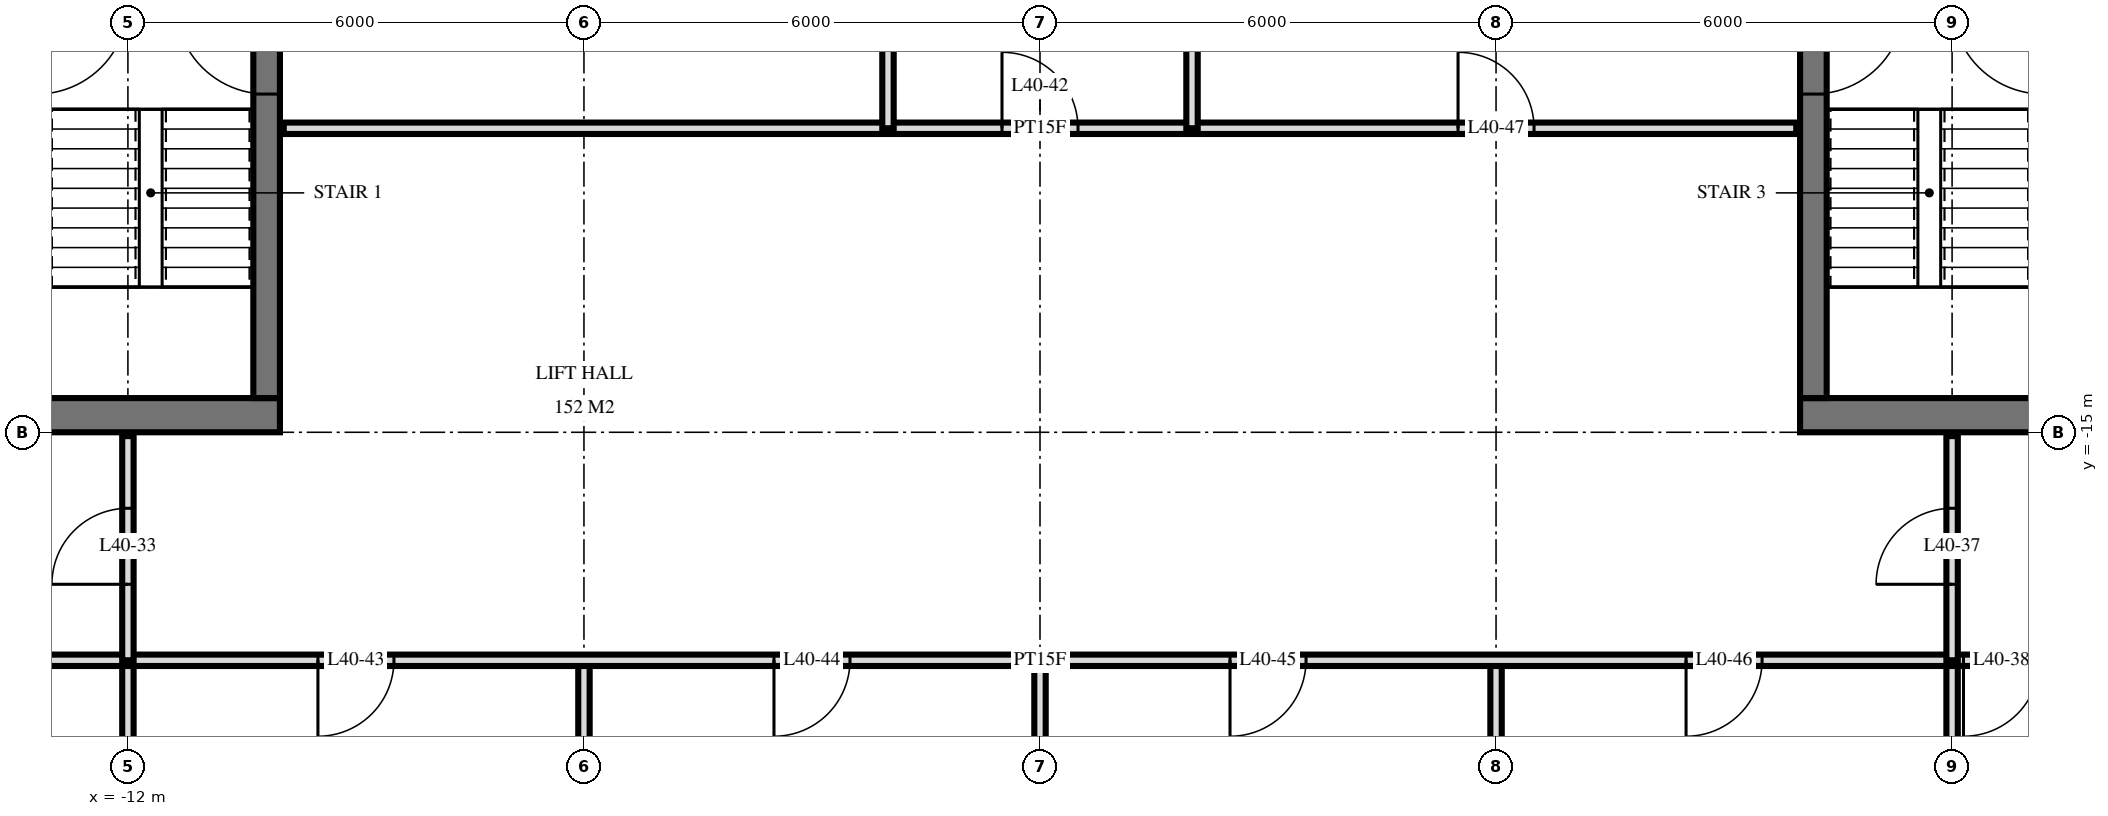
"""IFC4 building model, lengths in metres.
Left out: names, types, materials, properties, quantities, classifications, styles, units other than length and angle.
Written with IfcOpenShell. Run it as: python <this file> out.ifc"""

import sys

from ifc_helpers import new_model, si_unit, direction, frame, frame_2d, origin, place, context, subcontext, project, spatial, rectangle, extrude, element, fill, save


model = new_model("IFC4")
c1 = context("Model", 3, precision=1e-05, world=origin(), true_north=direction((0.0, 1.0)))
c2 = subcontext(c1, "Body", "Model", "MODEL_VIEW")
j1 = project(units=[si_unit("LENGTHUNIT", "METRE"), si_unit("PLANEANGLEUNIT", "RADIAN")], contexts=[c1])
p1 = place(None, origin())
s1 = spatial("IfcSite", under=j1, at=p1, CompositionType="ELEMENT")
p2 = place(p1, origin())
s2 = spatial("IfcBuilding", under=s1, at=p2, CompositionType="ELEMENT")
p3 = place(p2, frame((0.0, 0.0, 156.0)))
s3 = spatial("IfcBuildingStorey", under=s2, at=p3, CompositionType="ELEMENT", Elevation=156.0)
p4 = place(p3, frame((-24.5, -14.775, 0.0), z_axis=(0.0, 0.0, 1.0), x_axis=(1.0, 0.0, 0.0)))
e1 = element("IfcWall", 1, at=p4, inside=s3, PredefinedType="SHEAR", context=c2, shape_type="SweptSolid", body=[
    extrude(rectangle(XDim=14.5, YDim=0.45, at=frame_2d((7.25, 0.0))), origin(), (0.0, 0.0, 1.0), 3.6),
])
p5 = place(p4, frame((6.2, 0.0, 0.0)))
e2 = element("IfcOpeningElement", 2, at=p5, cuts=e1, PredefinedType="OPENING", context=c2, shape_type="SweptSolid", body=[
    extrude(rectangle(XDim=1.2, YDim=2.1, at=frame_2d((0.6, 1.05))), frame((0.0, 0.235, 0.0), z_axis=(0.0, -1.0, 0.0), x_axis=(1.0, 0.0, 0.0)), (0.0, 0.0, 1.0), 0.47),
])
p6 = place(p4, frame((9.25, 0.0, 0.0)))
e3 = element("IfcOpeningElement", 3, at=p6, cuts=e1, PredefinedType="OPENING", context=c2, shape_type="SweptSolid", body=[
    extrude(rectangle(XDim=1.1, YDim=2.1, at=frame_2d((0.55, 1.05))), frame((0.0, 0.235, 0.0), z_axis=(0.0, -1.0, 0.0), x_axis=(1.0, 0.0, 0.0)), (0.0, 0.0, 1.0), 0.47),
])
p7 = place(p4, frame((3.5, 0.0, 0.0)))
e4 = element("IfcOpeningElement", 4, at=p7, cuts=e1, PredefinedType="OPENING", context=c2, shape_type="SweptSolid", body=[
    extrude(rectangle(XDim=0.9, YDim=2.1, at=frame_2d((0.45, 1.05))), frame((0.0, 0.235, 0.0), z_axis=(0.0, -1.0, 0.0), x_axis=(1.0, 0.0, 0.0)), (0.0, 0.0, 1.0), 0.47),
])
p8 = place(p4, frame((1.05, 0.0, 0.0)))
e5 = element("IfcOpeningElement", 5, at=p8, cuts=e1, PredefinedType="OPENING", context=c2, shape_type="SweptSolid", body=[
    extrude(rectangle(XDim=1.0, YDim=2.1, at=frame_2d((0.5, 1.05))), frame((0.0, 0.235, 0.0), z_axis=(0.0, -1.0, 0.0), x_axis=(1.0, 0.0, 0.0)), (0.0, 0.0, 1.0), 0.47),
])
p9 = place(p3, frame((-10.175, -14.55, 0.0), z_axis=(0.0, 0.0, 1.0), x_axis=(0.0, 1.0, 0.0)))
e6 = element("IfcWall", 6, at=p9, inside=s3, PredefinedType="SHEAR", context=c2, shape_type="SweptSolid", body=[
    extrude(rectangle(XDim=14.1, YDim=0.35, at=frame_2d((7.05, 0.0))), origin(), (0.0, 0.0, 1.0), 3.6),
])
p10 = place(p9, frame((8.4, 0.0, 0.0)))
e7 = element("IfcOpeningElement", 7, at=p10, cuts=e6, PredefinedType="OPENING", context=c2, shape_type="SweptSolid", body=[
    extrude(rectangle(XDim=1.4, YDim=2.4, at=frame_2d((0.7, 1.2))), frame((0.0, 0.185, 0.0), z_axis=(0.0, -1.0, 0.0), x_axis=(1.0, 0.0, 0.0)), (0.0, 0.0, 1.0), 0.37),
])
p11 = place(p9, frame((10.0, 0.0, 0.0)))
e8 = element("IfcOpeningElement", 8, at=p11, cuts=e6, PredefinedType="OPENING", context=c2, shape_type="SweptSolid", body=[
    extrude(rectangle(XDim=1.4, YDim=2.4, at=frame_2d((0.7, 1.2))), frame((0.0, 0.185, 0.0), z_axis=(0.0, -1.0, 0.0), x_axis=(1.0, 0.0, 0.0)), (0.0, 0.0, 1.0), 0.37),
])
p12 = place(p9, frame((4.0, 0.0, 0.0)))
e9 = element("IfcOpeningElement", 9, at=p12, cuts=e6, PredefinedType="OPENING", context=c2, shape_type="SweptSolid", body=[
    extrude(rectangle(XDim=1.2, YDim=2.1, at=frame_2d((0.6, 1.05))), frame((0.0, 0.185, 0.0), z_axis=(0.0, -1.0, 0.0), x_axis=(1.0, 0.0, 0.0)), (0.0, 0.0, 1.0), 0.37),
])
p13 = place(p3, frame((10.0, -14.775, 0.0), z_axis=(0.0, 0.0, 1.0), x_axis=(1.0, 0.0, 0.0)))
e10 = element("IfcWall", 10, at=p13, inside=s3, PredefinedType="SHEAR", context=c2, shape_type="SweptSolid", body=[
    extrude(rectangle(XDim=14.5, YDim=0.45, at=frame_2d((7.25, 0.0))), origin(), (0.0, 0.0, 1.0), 3.6),
])
p14 = place(p13, frame((7.1, 0.0, 0.0)))
e11 = element("IfcOpeningElement", 11, at=p14, cuts=e10, PredefinedType="OPENING", context=c2, shape_type="SweptSolid", body=[
    extrude(rectangle(XDim=1.2, YDim=2.1, at=frame_2d((0.6, 1.05))), frame((0.0, 0.235, 0.0), z_axis=(0.0, -1.0, 0.0), x_axis=(1.0, 0.0, 0.0)), (0.0, 0.0, 1.0), 0.47),
])
p15 = place(p13, frame((4.15, 0.0, 0.0)))
e12 = element("IfcOpeningElement", 12, at=p15, cuts=e10, PredefinedType="OPENING", context=c2, shape_type="SweptSolid", body=[
    extrude(rectangle(XDim=1.1, YDim=2.1, at=frame_2d((0.55, 1.05))), frame((0.0, 0.235, 0.0), z_axis=(0.0, -1.0, 0.0), x_axis=(1.0, 0.0, 0.0)), (0.0, 0.0, 1.0), 0.47),
])
p16 = place(p13, frame((10.1, 0.0, 0.0)))
e13 = element("IfcOpeningElement", 13, at=p16, cuts=e10, PredefinedType="OPENING", context=c2, shape_type="SweptSolid", body=[
    extrude(rectangle(XDim=0.9, YDim=2.1, at=frame_2d((0.45, 1.05))), frame((0.0, 0.235, 0.0), z_axis=(0.0, -1.0, 0.0), x_axis=(1.0, 0.0, 0.0)), (0.0, 0.0, 1.0), 0.47),
])
p17 = place(p13, frame((12.45, 0.0, 0.0)))
e14 = element("IfcOpeningElement", 14, at=p17, cuts=e10, PredefinedType="OPENING", context=c2, shape_type="SweptSolid", body=[
    extrude(rectangle(XDim=1.0, YDim=2.1, at=frame_2d((0.5, 1.05))), frame((0.0, 0.235, 0.0), z_axis=(0.0, -1.0, 0.0), x_axis=(1.0, 0.0, 0.0)), (0.0, 0.0, 1.0), 0.47),
])
p18 = place(p3, frame((10.175, -14.55, 0.0), z_axis=(0.0, 0.0, 1.0), x_axis=(0.0, 1.0, 0.0)))
e15 = element("IfcWall", 15, at=p18, inside=s3, PredefinedType="SHEAR", context=c2, shape_type="SweptSolid", body=[
    extrude(rectangle(XDim=14.1, YDim=0.35, at=frame_2d((7.05, 0.0))), origin(), (0.0, 0.0, 1.0), 3.6),
])
p19 = place(p18, frame((8.4, 0.0, 0.0)))
e16 = element("IfcOpeningElement", 16, at=p19, cuts=e15, PredefinedType="OPENING", context=c2, shape_type="SweptSolid", body=[
    extrude(rectangle(XDim=1.4, YDim=2.4, at=frame_2d((0.7, 1.2))), frame((0.0, 0.185, 0.0), z_axis=(0.0, -1.0, 0.0), x_axis=(1.0, 0.0, 0.0)), (0.0, 0.0, 1.0), 0.37),
])
p20 = place(p18, frame((10.0, 0.0, 0.0)))
e17 = element("IfcOpeningElement", 17, at=p20, cuts=e15, PredefinedType="OPENING", context=c2, shape_type="SweptSolid", body=[
    extrude(rectangle(XDim=1.4, YDim=2.4, at=frame_2d((0.7, 1.2))), frame((0.0, 0.185, 0.0), z_axis=(0.0, -1.0, 0.0), x_axis=(1.0, 0.0, 0.0)), (0.0, 0.0, 1.0), 0.37),
])
p21 = place(p18, frame((4.0, 0.0, 0.0)))
e18 = element("IfcOpeningElement", 18, at=p21, cuts=e15, PredefinedType="OPENING", context=c2, shape_type="SweptSolid", body=[
    extrude(rectangle(XDim=1.2, YDim=2.1, at=frame_2d((0.6, 1.05))), frame((0.0, 0.185, 0.0), z_axis=(0.0, -1.0, 0.0), x_axis=(1.0, 0.0, 0.0)), (0.0, 0.0, 1.0), 0.37),
])
p22 = place(p3, frame((12.0, -18.0, 0.0), z_axis=(0.0, 0.0, 1.0), x_axis=(0.0, 1.0, 0.0)))
e19 = element("IfcWall", 19, at=p22, inside=s3, PredefinedType="PARTITIONING", context=c2, shape_type="SweptSolid", body=[
    extrude(rectangle(XDim=2.95, YDim=0.15, at=frame_2d((1.475, 0.0))), origin(), (0.0, 0.0, 1.0), 3.32),
])
p23 = place(p22, frame((1.0, 0.0, 0.0)))
e20 = element("IfcOpeningElement", 20, at=p23, cuts=e19, PredefinedType="OPENING", context=c2, shape_type="SweptSolid", body=[
    extrude(rectangle(XDim=1.0, YDim=2.1, at=frame_2d((0.5, 1.05))), frame((0.0, 0.085, 0.0), z_axis=(0.0, -1.0, 0.0), x_axis=(1.0, 0.0, 0.0)), (0.0, 0.0, 1.0), 0.17),
])
for number, where, z_axis, x_axis in (
    (21, (12.0, -33.62, 0.0), (0.0, 0.0, 1.0), (0.0, 1.0, 0.0)),
    (22, (6.0, -33.62, 0.0), (0.0, 0.0, 1.0), (0.0, 1.0, 0.0)),
):
    element("IfcWall", number, at=place(p3, frame(where, z_axis=z_axis, x_axis=x_axis)), inside=s3, PredefinedType="PARTITIONING", context=c2, shape_type="SweptSolid", body=[
        extrude(rectangle(XDim=15.62, YDim=0.15, at=frame_2d((7.81, 0.0))), origin(), (0.0, 0.0, 1.0), 3.32),
    ])
p24 = place(p3, frame((2.0, -11.0, 0.0), z_axis=(0.0, 0.0, 1.0), x_axis=(0.0, 1.0, 0.0)))
e23 = element("IfcWall", 23, at=p24, inside=s3, PredefinedType="PARTITIONING", context=c2, shape_type="SweptSolid", body=[
    extrude(rectangle(XDim=4.0, YDim=0.15, at=frame_2d((2.0, 0.0))), origin(), (0.0, 0.0, 1.0), 3.32),
])
p25 = place(p3, frame((0.0, -33.62, 0.0), z_axis=(0.0, 0.0, 1.0), x_axis=(0.0, 1.0, 0.0)))
e24 = element("IfcWall", 24, at=p25, inside=s3, PredefinedType="PARTITIONING", context=c2, shape_type="SweptSolid", body=[
    extrude(rectangle(XDim=15.62, YDim=0.15, at=frame_2d((7.81, 0.0))), origin(), (0.0, 0.0, 1.0), 3.32),
])
p26 = place(p3, frame((-2.0, -11.0, 0.0), z_axis=(0.0, 0.0, 1.0), x_axis=(0.0, 1.0, 0.0)))
e25 = element("IfcWall", 25, at=p26, inside=s3, PredefinedType="PARTITIONING", context=c2, shape_type="SweptSolid", body=[
    extrude(rectangle(XDim=4.0, YDim=0.15, at=frame_2d((2.0, 0.0))), origin(), (0.0, 0.0, 1.0), 3.32),
])
p27 = place(p3, frame((-6.0, -33.62, 0.0), z_axis=(0.0, 0.0, 1.0), x_axis=(0.0, 1.0, 0.0)))
e26 = element("IfcWall", 26, at=p27, inside=s3, PredefinedType="PARTITIONING", context=c2, shape_type="SweptSolid", body=[
    extrude(rectangle(XDim=15.62, YDim=0.15, at=frame_2d((7.81, 0.0))), origin(), (0.0, 0.0, 1.0), 3.32),
])
p28 = place(p3, frame((-12.0, -18.0, 0.0), z_axis=(0.0, 0.0, 1.0), x_axis=(0.0, 1.0, 0.0)))
e27 = element("IfcWall", 27, at=p28, inside=s3, PredefinedType="PARTITIONING", context=c2, shape_type="SweptSolid", body=[
    extrude(rectangle(XDim=2.95, YDim=0.15, at=frame_2d((1.475, 0.0))), origin(), (0.0, 0.0, 1.0), 3.32),
])
p29 = place(p28, frame((1.0, 0.0, 0.0)))
e28 = element("IfcOpeningElement", 28, at=p29, cuts=e27, PredefinedType="OPENING", context=c2, shape_type="SweptSolid", body=[
    extrude(rectangle(XDim=1.0, YDim=2.1, at=frame_2d((0.5, 1.05))), frame((0.0, 0.085, 0.0), z_axis=(0.0, -1.0, 0.0), x_axis=(1.0, 0.0, 0.0)), (0.0, 0.0, 1.0), 0.17),
])
p30 = place(p3, frame((-12.0, -33.62, 0.0), z_axis=(0.0, 0.0, 1.0), x_axis=(0.0, 1.0, 0.0)))
e29 = element("IfcWall", 29, at=p30, inside=s3, PredefinedType="PARTITIONING", context=c2, shape_type="SweptSolid", body=[
    extrude(rectangle(XDim=15.62, YDim=0.15, at=frame_2d((7.81, 0.0))), origin(), (0.0, 0.0, 1.0), 3.32),
])
p31 = place(p3, frame((-28.02, -18.0, 0.0), z_axis=(0.0, 0.0, 1.0), x_axis=(1.0, 0.0, 0.0)))
e30 = element("IfcWall", 30, at=p31, inside=s3, PredefinedType="PARTITIONING", context=c2, shape_type="SweptSolid", body=[
    extrude(rectangle(XDim=56.04, YDim=0.15, at=frame_2d((28.02, 0.0))), origin(), (0.0, 0.0, 1.0), 3.32),
])
p32 = place(p31, frame((12.52, 0.0, 0.0)))
e31 = element("IfcOpeningElement", 31, at=p32, cuts=e30, PredefinedType="OPENING", context=c2, shape_type="SweptSolid", body=[
    extrude(rectangle(XDim=1.0, YDim=2.1, at=frame_2d((0.5, 1.05))), frame((0.0, 0.085, 0.0), z_axis=(0.0, -1.0, 0.0), x_axis=(1.0, 0.0, 0.0)), (0.0, 0.0, 1.0), 0.17),
])
p33 = place(p31, frame((8.32, 0.0, 0.0)))
e32 = element("IfcOpeningElement", 32, at=p33, cuts=e30, PredefinedType="OPENING", context=c2, shape_type="SweptSolid", body=[
    extrude(rectangle(XDim=1.0, YDim=2.1, at=frame_2d((0.5, 1.05))), frame((0.0, 0.085, 0.0), z_axis=(0.0, -1.0, 0.0), x_axis=(1.0, 0.0, 0.0)), (0.0, 0.0, 1.0), 0.17),
])
p34 = place(p31, frame((40.17, 0.0, 0.0)))
e33 = element("IfcOpeningElement", 33, at=p34, cuts=e30, PredefinedType="OPENING", context=c2, shape_type="SweptSolid", body=[
    extrude(rectangle(XDim=1.0, YDim=2.1, at=frame_2d((0.5, 1.05))), frame((0.0, 0.085, 0.0), z_axis=(0.0, -1.0, 0.0), x_axis=(1.0, 0.0, 0.0)), (0.0, 0.0, 1.0), 0.17),
])
p35 = place(p31, frame((44.87, 0.0, 0.0)))
e34 = element("IfcOpeningElement", 34, at=p35, cuts=e30, PredefinedType="OPENING", context=c2, shape_type="SweptSolid", body=[
    extrude(rectangle(XDim=1.0, YDim=2.1, at=frame_2d((0.5, 1.05))), frame((0.0, 0.085, 0.0), z_axis=(0.0, -1.0, 0.0), x_axis=(1.0, 0.0, 0.0)), (0.0, 0.0, 1.0), 0.17),
])
p36 = place(p31, frame((46.72, 0.0, 0.0)))
e35 = element("IfcOpeningElement", 35, at=p36, cuts=e30, PredefinedType="OPENING", context=c2, shape_type="SweptSolid", body=[
    extrude(rectangle(XDim=1.0, YDim=2.1, at=frame_2d((0.5, 1.05))), frame((0.0, 0.085, 0.0), z_axis=(0.0, -1.0, 0.0), x_axis=(1.0, 0.0, 0.0)), (0.0, 0.0, 1.0), 0.17),
])
p37 = place(p31, frame((18.52, 0.0, 0.0)))
e36 = element("IfcOpeningElement", 36, at=p37, cuts=e30, PredefinedType="OPENING", context=c2, shape_type="SweptSolid", body=[
    extrude(rectangle(XDim=1.0, YDim=2.1, at=frame_2d((0.5, 1.05))), frame((0.0, 0.085, 0.0), z_axis=(0.0, -1.0, 0.0), x_axis=(1.0, 0.0, 0.0)), (0.0, 0.0, 1.0), 0.17),
])
p38 = place(p31, frame((24.52, 0.0, 0.0)))
e37 = element("IfcOpeningElement", 37, at=p38, cuts=e30, PredefinedType="OPENING", context=c2, shape_type="SweptSolid", body=[
    extrude(rectangle(XDim=1.0, YDim=2.1, at=frame_2d((0.5, 1.05))), frame((0.0, 0.085, 0.0), z_axis=(0.0, -1.0, 0.0), x_axis=(1.0, 0.0, 0.0)), (0.0, 0.0, 1.0), 0.17),
])
p39 = place(p31, frame((30.52, 0.0, 0.0)))
e38 = element("IfcOpeningElement", 38, at=p39, cuts=e30, PredefinedType="OPENING", context=c2, shape_type="SweptSolid", body=[
    extrude(rectangle(XDim=1.0, YDim=2.1, at=frame_2d((0.5, 1.05))), frame((0.0, 0.085, 0.0), z_axis=(0.0, -1.0, 0.0), x_axis=(1.0, 0.0, 0.0)), (0.0, 0.0, 1.0), 0.17),
])
p40 = place(p31, frame((36.52, 0.0, 0.0)))
e39 = element("IfcOpeningElement", 39, at=p40, cuts=e30, PredefinedType="OPENING", context=c2, shape_type="SweptSolid", body=[
    extrude(rectangle(XDim=1.0, YDim=2.1, at=frame_2d((0.5, 1.05))), frame((0.0, 0.085, 0.0), z_axis=(0.0, -1.0, 0.0), x_axis=(1.0, 0.0, 0.0)), (0.0, 0.0, 1.0), 0.17),
])
p41 = place(p3, frame((-9.95, -11.0, 0.0), z_axis=(0.0, 0.0, 1.0), x_axis=(1.0, 0.0, 0.0)))
e40 = element("IfcWall", 40, at=p41, inside=s3, PredefinedType="PARTITIONING", context=c2, shape_type="SweptSolid", body=[
    extrude(rectangle(XDim=19.9, YDim=0.15, at=frame_2d((9.95, 0.0))), origin(), (0.0, 0.0, 1.0), 3.32),
])
p42 = place(p41, frame((9.45, 0.0, 0.0)))
e41 = element("IfcOpeningElement", 41, at=p42, cuts=e40, PredefinedType="OPENING", context=c2, shape_type="SweptSolid", body=[
    extrude(rectangle(XDim=1.0, YDim=2.1, at=frame_2d((0.5, 1.05))), frame((0.0, 0.085, 0.0), z_axis=(0.0, -1.0, 0.0), x_axis=(1.0, 0.0, 0.0)), (0.0, 0.0, 1.0), 0.17),
])
p43 = place(p41, frame((15.45, 0.0, 0.0)))
e42 = element("IfcOpeningElement", 42, at=p43, cuts=e40, PredefinedType="OPENING", context=c2, shape_type="SweptSolid", body=[
    extrude(rectangle(XDim=1.0, YDim=2.1, at=frame_2d((0.5, 1.05))), frame((0.0, 0.085, 0.0), z_axis=(0.0, -1.0, 0.0), x_axis=(1.0, 0.0, 0.0)), (0.0, 0.0, 1.0), 0.17),
])
p44 = place(p12, origin())
e43 = element("IfcDoor", 43, at=p44, inside=s3, OperationType="SINGLE_SWING_LEFT", PredefinedType="DOOR", context=c2, shape_type="SweptSolid", body=[
    extrude(rectangle(XDim=1.2, YDim=2.1, at=frame_2d((0.6, 1.05))), frame((0.0, 0.025, 0.0), z_axis=(0.0, -1.0, 0.0), x_axis=(1.0, 0.0, 0.0)), (0.0, 0.0, 1.0), 0.05),
])
fill(e9, e43)
p45 = place(p21, frame((0.6, 0.0, 0.0), z_axis=(0.0, 0.0, 1.0), x_axis=(-1.0, 0.0, 0.0)))
e44 = element("IfcDoor", 44, at=p45, inside=s3, OperationType="SINGLE_SWING_RIGHT", PredefinedType="DOOR", context=c2, shape_type="SweptSolid", body=[
    extrude(rectangle(XDim=1.2, YDim=2.1, at=frame_2d((0.0, 1.05))), frame((0.0, -0.025, 0.0), z_axis=(0.0, 1.0, 0.0), x_axis=(-1.0, 0.0, 0.0)), (0.0, 0.0, 1.0), 0.05),
])
fill(e18, e44)
p46 = place(p29, origin())
e45 = element("IfcDoor", 45, at=p46, inside=s3, OperationType="SINGLE_SWING_RIGHT", PredefinedType="DOOR", context=c2, shape_type="SweptSolid", body=[
    extrude(rectangle(XDim=1.0, YDim=2.1, at=frame_2d((0.5, 1.05))), frame((0.0, 0.025, 0.0), z_axis=(0.0, -1.0, 0.0), x_axis=(1.0, 0.0, 0.0)), (0.0, 0.0, 1.0), 0.05),
])
fill(e28, e45)
p47 = place(p23, origin())
e46 = element("IfcDoor", 46, at=p47, inside=s3, OperationType="SINGLE_SWING_RIGHT", PredefinedType="DOOR", context=c2, shape_type="SweptSolid", body=[
    extrude(rectangle(XDim=1.0, YDim=2.1, at=frame_2d((0.5, 1.05))), frame((0.0, 0.025, 0.0), z_axis=(0.0, -1.0, 0.0), x_axis=(1.0, 0.0, 0.0)), (0.0, 0.0, 1.0), 0.05),
])
fill(e20, e46)
p48 = place(p34, frame((0.5, 0.0, 0.0), z_axis=(0.0, 0.0, 1.0), x_axis=(-1.0, 0.0, 0.0)))
e47 = element("IfcDoor", 47, at=p48, inside=s3, OperationType="SINGLE_SWING_LEFT", PredefinedType="DOOR", context=c2, shape_type="SweptSolid", body=[
    extrude(rectangle(XDim=1.0, YDim=2.1, at=frame_2d((0.0, 1.05))), frame((0.0, -0.025, 0.0), z_axis=(0.0, 1.0, 0.0), x_axis=(-1.0, 0.0, 0.0)), (0.0, 0.0, 1.0), 0.05),
])
fill(e33, e47)
p49 = place(p42, origin())
e48 = element("IfcDoor", 48, at=p49, inside=s3, OperationType="SINGLE_SWING_RIGHT", PredefinedType="DOOR", context=c2, shape_type="SweptSolid", body=[
    extrude(rectangle(XDim=1.0, YDim=2.1, at=frame_2d((0.5, 1.05))), frame((0.0, 0.025, 0.0), z_axis=(0.0, -1.0, 0.0), x_axis=(1.0, 0.0, 0.0)), (0.0, 0.0, 1.0), 0.05),
])
fill(e41, e48)
p50 = place(p37, frame((0.5, 0.0, 0.0), z_axis=(0.0, 0.0, 1.0), x_axis=(-1.0, 0.0, 0.0)))
e49 = element("IfcDoor", 49, at=p50, inside=s3, OperationType="SINGLE_SWING_LEFT", PredefinedType="DOOR", context=c2, shape_type="SweptSolid", body=[
    extrude(rectangle(XDim=1.0, YDim=2.1, at=frame_2d((0.0, 1.05))), frame((0.0, -0.025, 0.0), z_axis=(0.0, 1.0, 0.0), x_axis=(-1.0, 0.0, 0.0)), (0.0, 0.0, 1.0), 0.05),
])
fill(e36, e49)
p51 = place(p38, frame((0.5, 0.0, 0.0), z_axis=(0.0, 0.0, 1.0), x_axis=(-1.0, 0.0, 0.0)))
e50 = element("IfcDoor", 50, at=p51, inside=s3, OperationType="SINGLE_SWING_LEFT", PredefinedType="DOOR", context=c2, shape_type="SweptSolid", body=[
    extrude(rectangle(XDim=1.0, YDim=2.1, at=frame_2d((0.0, 1.05))), frame((0.0, -0.025, 0.0), z_axis=(0.0, 1.0, 0.0), x_axis=(-1.0, 0.0, 0.0)), (0.0, 0.0, 1.0), 0.05),
])
fill(e37, e50)
p52 = place(p39, frame((0.5, 0.0, 0.0), z_axis=(0.0, 0.0, 1.0), x_axis=(-1.0, 0.0, 0.0)))
e51 = element("IfcDoor", 51, at=p52, inside=s3, OperationType="SINGLE_SWING_LEFT", PredefinedType="DOOR", context=c2, shape_type="SweptSolid", body=[
    extrude(rectangle(XDim=1.0, YDim=2.1, at=frame_2d((0.0, 1.05))), frame((0.0, -0.025, 0.0), z_axis=(0.0, 1.0, 0.0), x_axis=(-1.0, 0.0, 0.0)), (0.0, 0.0, 1.0), 0.05),
])
fill(e38, e51)
p53 = place(p40, frame((0.5, 0.0, 0.0), z_axis=(0.0, 0.0, 1.0), x_axis=(-1.0, 0.0, 0.0)))
e52 = element("IfcDoor", 52, at=p53, inside=s3, OperationType="SINGLE_SWING_LEFT", PredefinedType="DOOR", context=c2, shape_type="SweptSolid", body=[
    extrude(rectangle(XDim=1.0, YDim=2.1, at=frame_2d((0.0, 1.05))), frame((0.0, -0.025, 0.0), z_axis=(0.0, 1.0, 0.0), x_axis=(-1.0, 0.0, 0.0)), (0.0, 0.0, 1.0), 0.05),
])
fill(e39, e52)
p54 = place(p43, origin())
e53 = element("IfcDoor", 53, at=p54, inside=s3, OperationType="SINGLE_SWING_RIGHT", PredefinedType="DOOR", context=c2, shape_type="SweptSolid", body=[
    extrude(rectangle(XDim=1.0, YDim=2.1, at=frame_2d((0.5, 1.05))), frame((0.0, 0.025, 0.0), z_axis=(0.0, -1.0, 0.0), x_axis=(1.0, 0.0, 0.0)), (0.0, 0.0, 1.0), 0.05),
])
fill(e42, e53)
save(model, sys.argv[1])
